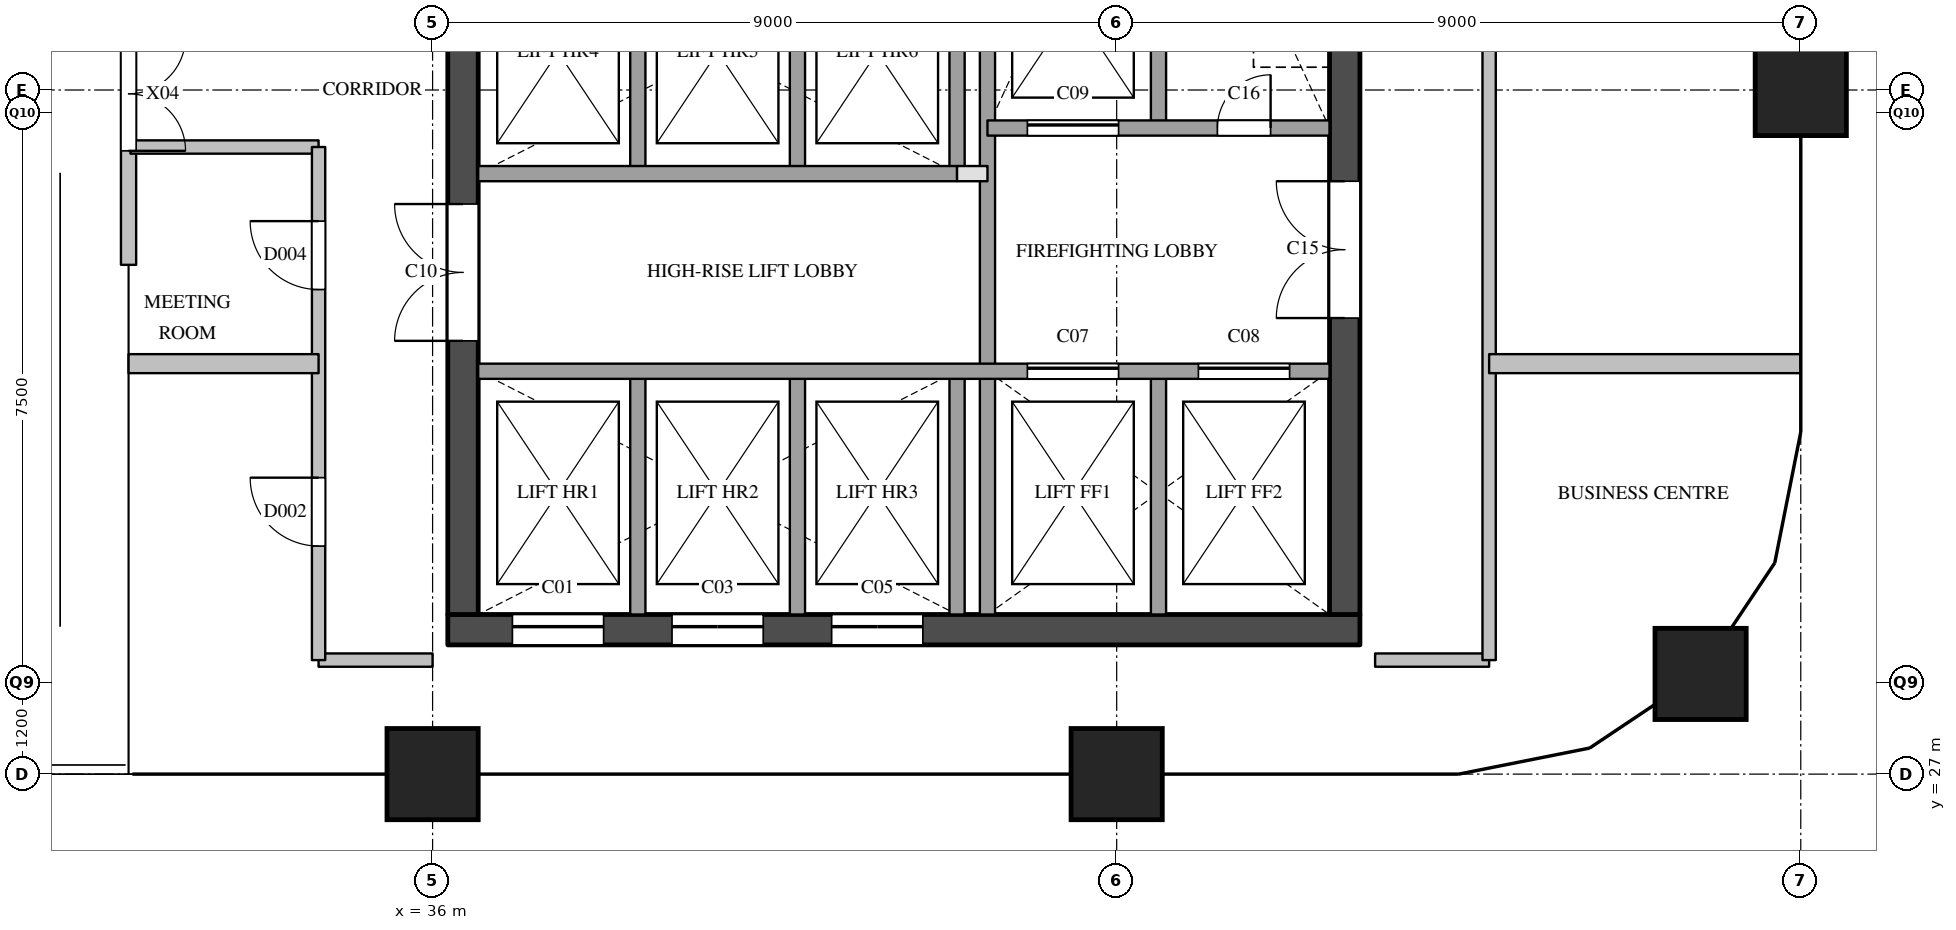
"""IFC4 building model, lengths in metres.
Left out: names, types, materials, properties, quantities, classifications, styles, units other than length and angle.
Written with IfcOpenShell. Run it as: python <this file> out.ifc"""

import sys

from ifc_helpers import new_model, si_unit, direction, frame, frame_2d, origin, origin_2d, place, context, subcontext, project, spatial, rectangle, extrude, element, fill, save


model = new_model("IFC4")
c1 = context("Model", 3, precision=1e-05, world=origin(), true_north=direction((0.0, 1.0)))
c2 = subcontext(c1, "Body", "Model", "MODEL_VIEW")
j1 = project(units=[si_unit("LENGTHUNIT", "METRE"), si_unit("PLANEANGLEUNIT", "RADIAN")], contexts=[c1])
p1 = place(None, origin())
s1 = spatial("IfcSite", under=j1, at=p1, CompositionType="ELEMENT")
p2 = place(p1, origin())
s2 = spatial("IfcBuilding", under=s1, at=p2, CompositionType="ELEMENT")
p3 = place(p2, frame((0.0, 0.0, 203.3)))
s3 = spatial("IfcBuildingStorey", under=s2, at=p3, CompositionType="ELEMENT", Elevation=203.3)
for number, where, z_axis, x_axis in (
    (1, (36.0, 27.0, 0.0), (0.0, 0.0, 1.0), (1.0, 0.0, 0.0)),
    (2, (45.0, 27.0, 0.0), (0.0, 0.0, 1.0), (1.0, 0.0, 0.0)),
    (3, (52.682, 28.318, 0.0), (0.0, 0.0, 1.0), (1.0, 0.0, 0.0)),
    (4, (54.0, 36.0, 0.0), (0.0, 0.0, 1.0), (1.0, 0.0, 0.0)),
):
    element("IfcColumn", number, at=place(p3, frame(where, z_axis=z_axis, x_axis=x_axis)), inside=s3, PredefinedType="COLUMN", context=c2, shape_type="SweptSolid", body=[
        extrude(rectangle(XDim=1.2, YDim=1.2, at=origin_2d()), origin(), (0.0, 0.0, 1.0), 3.9),
    ])
p4 = place(p3, frame((32.0, 38.2, 0.0), z_axis=(0.0, 0.0, 1.0), x_axis=(0.0, -1.0, 0.0)))
e5 = element("IfcWall", 5, at=p4, inside=s3, PredefinedType="SOLIDWALL", context=c2, shape_type="SweptSolid", body=[
    extrude(rectangle(XDim=4.5, YDim=0.2, at=frame_2d((2.25, 0.0))), origin(), (0.0, 0.0, 1.0), 2.6),
])
p5 = place(p4, frame((1.5, 0.0, 0.0)))
e6 = element("IfcOpeningElement", 6, at=p5, cuts=e5, PredefinedType="OPENING", context=c2, shape_type="SweptSolid", body=[
    extrude(rectangle(XDim=1.5, YDim=2.1, at=frame_2d((0.75, 1.05))), frame((0.0, 0.11, 0.0), z_axis=(0.0, -1.0, 0.0), x_axis=(1.0, 0.0, 0.0)), (0.0, 0.0, 1.0), 0.22),
])
p6 = place(p3, frame((36.2, 28.9, 0.0), z_axis=(0.0, 0.0, 1.0), x_axis=(1.0, 0.0, 0.0)))
e7 = element("IfcWall", 7, at=p6, inside=s3, PredefinedType="SHEAR", context=c2, shape_type="SweptSolid", body=[
    extrude(rectangle(XDim=12.0, YDim=0.4, at=frame_2d((6.0, 0.0))), origin(), (0.0, 0.0, 1.0), 3.6),
])
p7 = place(p6, frame((0.85, 0.0, 0.0)))
e8 = element("IfcOpeningElement", 8, at=p7, cuts=e7, PredefinedType="OPENING", context=c2, shape_type="SweptSolid", body=[
    extrude(rectangle(XDim=1.2, YDim=2.1, at=frame_2d((0.6, 1.05))), frame((0.0, 0.21, 0.0), z_axis=(0.0, -1.0, 0.0), x_axis=(1.0, 0.0, 0.0)), (0.0, 0.0, 1.0), 0.42),
])
p8 = place(p6, frame((2.95, 0.0, 0.0)))
e9 = element("IfcOpeningElement", 9, at=p8, cuts=e7, PredefinedType="OPENING", context=c2, shape_type="SweptSolid", body=[
    extrude(rectangle(XDim=1.2, YDim=2.1, at=frame_2d((0.6, 1.05))), frame((0.0, 0.21, 0.0), z_axis=(0.0, -1.0, 0.0), x_axis=(1.0, 0.0, 0.0)), (0.0, 0.0, 1.0), 0.42),
])
p9 = place(p6, frame((5.05, 0.0, 0.0)))
e10 = element("IfcOpeningElement", 10, at=p9, cuts=e7, PredefinedType="OPENING", context=c2, shape_type="SweptSolid", body=[
    extrude(rectangle(XDim=1.2, YDim=2.1, at=frame_2d((0.6, 1.05))), frame((0.0, 0.21, 0.0), z_axis=(0.0, -1.0, 0.0), x_axis=(1.0, 0.0, 0.0)), (0.0, 0.0, 1.0), 0.42),
])
p10 = place(p3, frame((36.4, 29.1, 0.0), z_axis=(0.0, 0.0, 1.0), x_axis=(0.0, 1.0, 0.0)))
e11 = element("IfcWall", 11, at=p10, inside=s3, PredefinedType="SHEAR", context=c2, shape_type="SweptSolid", body=[
    extrude(rectangle(XDim=20.3, YDim=0.4, at=frame_2d((10.15, 0.0))), origin(), (0.0, 0.0, 1.0), 3.6),
])
p11 = place(p10, frame((3.6, 0.0, 0.0)))
e12 = element("IfcOpeningElement", 12, at=p11, cuts=e11, PredefinedType="OPENING", context=c2, shape_type="SweptSolid", body=[
    extrude(rectangle(XDim=1.8, YDim=2.1, at=frame_2d((0.9, 1.05))), frame((0.0, 0.21, 0.0), z_axis=(0.0, -1.0, 0.0), x_axis=(1.0, 0.0, 0.0)), (0.0, 0.0, 1.0), 0.42),
])
p12 = place(p10, frame((16.4, 0.0, 0.0)))
e13 = element("IfcOpeningElement", 13, at=p12, cuts=e11, PredefinedType="OPENING", context=c2, shape_type="SweptSolid", body=[
    extrude(rectangle(XDim=1.0, YDim=2.1, at=frame_2d((0.5, 1.05))), frame((0.0, 0.21, 0.0), z_axis=(0.0, -1.0, 0.0), x_axis=(1.0, 0.0, 0.0)), (0.0, 0.0, 1.0), 0.42),
])
p13 = place(p3, frame((48.0, 29.1, 0.0), z_axis=(0.0, 0.0, 1.0), x_axis=(0.0, 1.0, 0.0)))
e14 = element("IfcWall", 14, at=p13, inside=s3, PredefinedType="SHEAR", context=c2, shape_type="SweptSolid", body=[
    extrude(rectangle(XDim=20.3, YDim=0.4, at=frame_2d((10.15, 0.0))), origin(), (0.0, 0.0, 1.0), 3.6),
])
p14 = place(p13, frame((12.5, 0.0, 0.0)))
e15 = element("IfcOpeningElement", 15, at=p14, cuts=e14, PredefinedType="OPENING", context=c2, shape_type="SweptSolid", body=[
    extrude(rectangle(XDim=0.7, YDim=2.1, at=frame_2d((0.35, 1.05))), frame((0.0, 0.21, 0.0), z_axis=(0.0, -1.0, 0.0), x_axis=(1.0, 0.0, 0.0)), (0.0, 0.0, 1.0), 0.42),
])
p15 = place(p13, frame((3.9, 0.0, 0.0)))
e16 = element("IfcOpeningElement", 16, at=p15, cuts=e14, PredefinedType="OPENING", context=c2, shape_type="SweptSolid", body=[
    extrude(rectangle(XDim=1.8, YDim=2.1, at=frame_2d((0.9, 1.05))), frame((0.0, 0.21, 0.0), z_axis=(0.0, -1.0, 0.0), x_axis=(1.0, 0.0, 0.0)), (0.0, 0.0, 1.0), 0.42),
])
p16 = place(p3, frame((38.7, 29.1, 0.0), z_axis=(0.0, 0.0, 1.0), x_axis=(0.0, 1.0, 0.0)))
e17 = element("IfcWall", 17, at=p16, inside=s3, PredefinedType="SOLIDWALL", context=c2, shape_type="SweptSolid", body=[
    extrude(rectangle(XDim=3.2, YDim=0.2, at=frame_2d((1.6, 0.0))), origin(), (0.0, 0.0, 1.0), 3.6),
])
p17 = place(p3, frame((38.7, 34.9, 0.0), z_axis=(0.0, 0.0, 1.0), x_axis=(0.0, 1.0, 0.0)))
e18 = element("IfcWall", 18, at=p17, inside=s3, PredefinedType="SOLIDWALL", context=c2, shape_type="SweptSolid", body=[
    extrude(rectangle(XDim=3.2, YDim=0.2, at=frame_2d((1.6, 0.0))), origin(), (0.0, 0.0, 1.0), 3.6),
])
p18 = place(p3, frame((40.8, 29.1, 0.0), z_axis=(0.0, 0.0, 1.0), x_axis=(0.0, 1.0, 0.0)))
e19 = element("IfcWall", 19, at=p18, inside=s3, PredefinedType="SOLIDWALL", context=c2, shape_type="SweptSolid", body=[
    extrude(rectangle(XDim=3.2, YDim=0.2, at=frame_2d((1.6, 0.0))), origin(), (0.0, 0.0, 1.0), 3.6),
])
p19 = place(p3, frame((40.8, 34.9, 0.0), z_axis=(0.0, 0.0, 1.0), x_axis=(0.0, 1.0, 0.0)))
e20 = element("IfcWall", 20, at=p19, inside=s3, PredefinedType="SOLIDWALL", context=c2, shape_type="SweptSolid", body=[
    extrude(rectangle(XDim=3.2, YDim=0.2, at=frame_2d((1.6, 0.0))), origin(), (0.0, 0.0, 1.0), 3.6),
])
p20 = place(p3, frame((42.9, 29.1, 0.0), z_axis=(0.0, 0.0, 1.0), x_axis=(0.0, 1.0, 0.0)))
e21 = element("IfcWall", 21, at=p20, inside=s3, PredefinedType="SOLIDWALL", context=c2, shape_type="SweptSolid", body=[
    extrude(rectangle(XDim=3.2, YDim=0.2, at=frame_2d((1.6, 0.0))), origin(), (0.0, 0.0, 1.0), 3.6),
])
p21 = place(p3, frame((42.9, 34.9, 0.0), z_axis=(0.0, 0.0, 1.0), x_axis=(0.0, 1.0, 0.0)))
e22 = element("IfcWall", 22, at=p21, inside=s3, PredefinedType="SOLIDWALL", context=c2, shape_type="SweptSolid", body=[
    extrude(rectangle(XDim=3.2, YDim=0.2, at=frame_2d((1.6, 0.0))), origin(), (0.0, 0.0, 1.0), 3.6),
])
p22 = place(p3, frame((43.3, 29.1, 0.0), z_axis=(0.0, 0.0, 1.0), x_axis=(0.0, 1.0, 0.0)))
e23 = element("IfcWall", 23, at=p22, inside=s3, PredefinedType="SOLIDWALL", context=c2, shape_type="SweptSolid", body=[
    extrude(rectangle(XDim=9.9, YDim=0.2, at=frame_2d((4.95, 0.0))), origin(), (0.0, 0.0, 1.0), 3.6),
])
for number, where, z_axis, x_axis in (
    (24, (45.55, 29.1, 0.0), (0.0, 0.0, 1.0), (0.0, 1.0, 0.0)),
    (25, (45.55, 35.5, 0.0), (0.0, 0.0, 1.0), (0.0, 1.0, 0.0)),
):
    element("IfcWall", number, at=place(p3, frame(where, z_axis=z_axis, x_axis=x_axis)), inside=s3, PredefinedType="SOLIDWALL", context=c2, shape_type="SweptSolid", body=[
        extrude(rectangle(XDim=3.2, YDim=0.2, at=frame_2d((1.6, 0.0))), origin(), (0.0, 0.0, 1.0), 3.6),
    ])
p23 = place(p3, frame((36.6, 32.3, 0.0), z_axis=(0.0, 0.0, 1.0), x_axis=(1.0, 0.0, 0.0)))
e26 = element("IfcWall", 26, at=p23, inside=s3, PredefinedType="SOLIDWALL", context=c2, shape_type="SweptSolid", body=[
    extrude(rectangle(XDim=11.2, YDim=0.2, at=frame_2d((5.6, 0.0))), origin(), (0.0, 0.0, 1.0), 3.6),
])
p24 = place(p23, frame((7.225, 0.0, 0.0)))
e27 = element("IfcOpeningElement", 27, at=p24, cuts=e26, PredefinedType="OPENING", context=c2, shape_type="SweptSolid", body=[
    extrude(rectangle(XDim=1.2, YDim=2.1, at=frame_2d((0.6, 1.05))), frame((0.0, 0.11, 0.0), z_axis=(0.0, -1.0, 0.0), x_axis=(1.0, 0.0, 0.0)), (0.0, 0.0, 1.0), 0.22),
])
p25 = place(p23, frame((9.475, 0.0, 0.0)))
e28 = element("IfcOpeningElement", 28, at=p25, cuts=e26, PredefinedType="OPENING", context=c2, shape_type="SweptSolid", body=[
    extrude(rectangle(XDim=1.2, YDim=2.1, at=frame_2d((0.6, 1.05))), frame((0.0, 0.11, 0.0), z_axis=(0.0, -1.0, 0.0), x_axis=(1.0, 0.0, 0.0)), (0.0, 0.0, 1.0), 0.22),
])
p26 = place(p3, frame((42.9, 34.9, 0.0), z_axis=(0.0, 0.0, 1.0), x_axis=(1.0, 0.0, 0.0)))
e29 = element("IfcWall", 29, at=p26, inside=s3, PredefinedType="PARTITIONING", context=c2, shape_type="SweptSolid", body=[
    extrude(rectangle(XDim=0.4, YDim=0.2, at=frame_2d((0.2, 0.0))), origin(), (0.0, 0.0, 1.0), 3.6),
])
p27 = place(p3, frame((36.6, 34.9, 0.0), z_axis=(0.0, 0.0, 1.0), x_axis=(1.0, 0.0, 0.0)))
e30 = element("IfcWall", 30, at=p27, inside=s3, PredefinedType="SOLIDWALL", context=c2, shape_type="SweptSolid", body=[
    extrude(rectangle(XDim=6.3, YDim=0.2, at=frame_2d((3.15, 0.0))), origin(), (0.0, 0.0, 1.0), 3.6),
])
p28 = place(p3, frame((43.3, 35.5, 0.0), z_axis=(0.0, 0.0, 1.0), x_axis=(1.0, 0.0, 0.0)))
e31 = element("IfcWall", 31, at=p28, inside=s3, PredefinedType="SOLIDWALL", context=c2, shape_type="SweptSolid", body=[
    extrude(rectangle(XDim=4.5, YDim=0.2, at=frame_2d((2.25, 0.0))), origin(), (0.0, 0.0, 1.0), 3.6),
])
p29 = place(p28, frame((0.525, 0.0, 0.0)))
e32 = element("IfcOpeningElement", 32, at=p29, cuts=e31, PredefinedType="OPENING", context=c2, shape_type="SweptSolid", body=[
    extrude(rectangle(XDim=1.2, YDim=2.1, at=frame_2d((0.6, 1.05))), frame((0.0, 0.11, 0.0), z_axis=(0.0, -1.0, 0.0), x_axis=(1.0, 0.0, 0.0)), (0.0, 0.0, 1.0), 0.22),
])
p30 = place(p28, frame((3.025, 0.0, 0.0)))
e33 = element("IfcOpeningElement", 33, at=p30, cuts=e31, PredefinedType="OPENING", context=c2, shape_type="SweptSolid", body=[
    extrude(rectangle(XDim=0.7, YDim=2.1, at=frame_2d((0.35, 1.05))), frame((0.0, 0.11, 0.0), z_axis=(0.0, -1.0, 0.0), x_axis=(1.0, 0.0, 0.0)), (0.0, 0.0, 1.0), 0.22),
])
for number, where, z_axis, x_axis in (
    (34, (34.5, 28.5, 0.0), (0.0, 0.0, 1.0), (1.0, 0.0, 0.0)),
    (35, (48.4, 28.5, 0.0), (0.0, 0.0, 1.0), (1.0, 0.0, 0.0)),
):
    element("IfcWall", number, at=place(p3, frame(where, z_axis=z_axis, x_axis=x_axis)), inside=s3, PredefinedType="PARTITIONING", context=c2, shape_type="SweptSolid", body=[
        extrude(rectangle(XDim=1.5, YDim=0.175, at=frame_2d((0.75, 0.0))), origin(), (0.0, 0.0, 1.0), 3.6),
    ])
p31 = place(p3, frame((32.025, 35.25, 0.0), z_axis=(0.0, 0.0, 1.0), x_axis=(1.0, 0.0, 0.0)))
e36 = element("IfcWall", 36, at=p31, inside=s3, PredefinedType="PARTITIONING", context=c2, shape_type="SweptSolid", body=[
    extrude(rectangle(XDim=2.475, YDim=0.175, at=frame_2d((1.237, 0.0))), origin(), (0.0, 0.0, 1.0), 3.6),
])
p32 = place(p3, frame((34.5, 28.5, 0.0), z_axis=(0.0, 0.0, 1.0), x_axis=(0.0, 1.0, 0.0)))
e37 = element("IfcWall", 37, at=p32, inside=s3, PredefinedType="PARTITIONING", context=c2, shape_type="SweptSolid", body=[
    extrude(rectangle(XDim=6.75, YDim=0.175, at=frame_2d((3.375, 0.0))), origin(), (0.0, 0.0, 1.0), 3.6),
])
p33 = place(p32, frame((1.5, 0.0, 0.0)))
e38 = element("IfcOpeningElement", 38, at=p33, cuts=e37, PredefinedType="OPENING", context=c2, shape_type="SweptSolid", body=[
    extrude(rectangle(XDim=0.9, YDim=2.1, at=frame_2d((0.45, 1.05))), frame((0.0, 0.097, 0.0), z_axis=(0.0, -1.0, 0.0), x_axis=(1.0, 0.0, 0.0)), (0.0, 0.0, 1.0), 0.195),
])
p34 = place(p32, frame((4.875, 0.0, 0.0)))
e39 = element("IfcOpeningElement", 39, at=p34, cuts=e37, PredefinedType="OPENING", context=c2, shape_type="SweptSolid", body=[
    extrude(rectangle(XDim=0.9, YDim=2.1, at=frame_2d((0.45, 1.05))), frame((0.0, 0.097, 0.0), z_axis=(0.0, -1.0, 0.0), x_axis=(1.0, 0.0, 0.0)), (0.0, 0.0, 1.0), 0.195),
])
p35 = place(p3, frame((49.9, 28.5, 0.0), z_axis=(0.0, 0.0, 1.0), x_axis=(0.0, 1.0, 0.0)))
e40 = element("IfcWall", 40, at=p35, inside=s3, PredefinedType="PARTITIONING", context=c2, shape_type="SweptSolid", body=[
    extrude(rectangle(XDim=23.0, YDim=0.175, at=frame_2d((11.5, 0.0))), origin(), (0.0, 0.0, 1.0), 3.6),
])
p36 = place(p35, frame((13.0, 0.0, 0.0)))
e41 = element("IfcOpeningElement", 41, at=p36, cuts=e40, PredefinedType="OPENING", context=c2, shape_type="SweptSolid", body=[
    extrude(rectangle(XDim=0.9, YDim=2.1, at=frame_2d((0.45, 1.05))), frame((0.0, 0.097, 0.0), z_axis=(0.0, -1.0, 0.0), x_axis=(1.0, 0.0, 0.0)), (0.0, 0.0, 1.0), 0.195),
])
p37 = place(p3, frame((32.0, 32.4, 0.0), z_axis=(0.0, 0.0, 1.0), x_axis=(1.0, 0.0, 0.0)))
e42 = element("IfcWall", 42, at=p37, inside=s3, PredefinedType="PARTITIONING", context=c2, shape_type="SweptSolid", body=[
    extrude(rectangle(XDim=2.5, YDim=0.25, at=frame_2d((1.25, 0.0))), origin(), (0.0, 0.0, 1.0), 3.6),
])
p38 = place(p3, frame((49.9, 32.4, 0.0), z_axis=(0.0, 0.0, 1.0), x_axis=(1.0, 0.0, 0.0)))
e43 = element("IfcWall", 43, at=p38, inside=s3, PredefinedType="PARTITIONING", context=c2, shape_type="SweptSolid", body=[
    extrude(rectangle(XDim=4.1, YDim=0.25, at=frame_2d((2.05, 0.0))), origin(), (0.0, 0.0, 1.0), 2.6),
])
p39 = place(p5, origin())
e44 = element("IfcDoor", 44, at=p39, inside=s3, OperationType="DOUBLE_DOOR_SINGLE_SWING", PredefinedType="DOOR", context=c2, shape_type="SweptSolid", body=[
    extrude(rectangle(XDim=1.5, YDim=2.1, at=frame_2d((0.75, 1.05))), frame((0.0, 0.025, 0.0), z_axis=(0.0, -1.0, 0.0), x_axis=(1.0, 0.0, 0.0)), (0.0, 0.0, 1.0), 0.05),
])
fill(e6, e44)
p40 = place(p7, origin())
e45 = element("IfcDoor", 45, at=p40, inside=s3, OperationType="SLIDING_TO_LEFT", PredefinedType="DOOR", context=c2, shape_type="SweptSolid", body=[
    extrude(rectangle(XDim=1.2, YDim=2.1, at=frame_2d((0.6, 1.05))), frame((0.0, 0.025, 0.0), z_axis=(0.0, -1.0, 0.0), x_axis=(1.0, 0.0, 0.0)), (0.0, 0.0, 1.0), 0.05),
])
fill(e8, e45)
p41 = place(p8, origin())
e46 = element("IfcDoor", 46, at=p41, inside=s3, OperationType="SLIDING_TO_LEFT", PredefinedType="DOOR", context=c2, shape_type="SweptSolid", body=[
    extrude(rectangle(XDim=1.2, YDim=2.1, at=frame_2d((0.6, 1.05))), frame((0.0, 0.025, 0.0), z_axis=(0.0, -1.0, 0.0), x_axis=(1.0, 0.0, 0.0)), (0.0, 0.0, 1.0), 0.05),
])
fill(e9, e46)
p42 = place(p9, origin())
e47 = element("IfcDoor", 47, at=p42, inside=s3, OperationType="SLIDING_TO_LEFT", PredefinedType="DOOR", context=c2, shape_type="SweptSolid", body=[
    extrude(rectangle(XDim=1.2, YDim=2.1, at=frame_2d((0.6, 1.05))), frame((0.0, 0.025, 0.0), z_axis=(0.0, -1.0, 0.0), x_axis=(1.0, 0.0, 0.0)), (0.0, 0.0, 1.0), 0.05),
])
fill(e10, e47)
p43 = place(p24, origin())
e48 = element("IfcDoor", 48, at=p43, inside=s3, OperationType="SLIDING_TO_LEFT", PredefinedType="DOOR", context=c2, shape_type="SweptSolid", body=[
    extrude(rectangle(XDim=1.2, YDim=2.1, at=frame_2d((0.6, 1.05))), frame((0.0, 0.025, 0.0), z_axis=(0.0, -1.0, 0.0), x_axis=(1.0, 0.0, 0.0)), (0.0, 0.0, 1.0), 0.05),
])
fill(e27, e48)
p44 = place(p25, origin())
e49 = element("IfcDoor", 49, at=p44, inside=s3, OperationType="SLIDING_TO_LEFT", PredefinedType="DOOR", context=c2, shape_type="SweptSolid", body=[
    extrude(rectangle(XDim=1.2, YDim=2.1, at=frame_2d((0.6, 1.05))), frame((0.0, 0.025, 0.0), z_axis=(0.0, -1.0, 0.0), x_axis=(1.0, 0.0, 0.0)), (0.0, 0.0, 1.0), 0.05),
])
fill(e28, e49)
p45 = place(p29, origin())
e50 = element("IfcDoor", 50, at=p45, inside=s3, OperationType="SLIDING_TO_LEFT", PredefinedType="DOOR", context=c2, shape_type="SweptSolid", body=[
    extrude(rectangle(XDim=1.2, YDim=2.1, at=frame_2d((0.6, 1.05))), frame((0.0, 0.025, 0.0), z_axis=(0.0, -1.0, 0.0), x_axis=(1.0, 0.0, 0.0)), (0.0, 0.0, 1.0), 0.05),
])
fill(e32, e50)
p46 = place(p11, origin())
e51 = element("IfcDoor", 51, at=p46, inside=s3, OperationType="DOUBLE_DOOR_SINGLE_SWING", PredefinedType="DOOR", context=c2, shape_type="SweptSolid", body=[
    extrude(rectangle(XDim=1.8, YDim=2.1, at=frame_2d((0.9, 1.05))), frame((0.0, 0.025, 0.0), z_axis=(0.0, -1.0, 0.0), x_axis=(1.0, 0.0, 0.0)), (0.0, 0.0, 1.0), 0.05),
])
fill(e12, e51)
p47 = place(p15, origin())
e52 = element("IfcDoor", 52, at=p47, inside=s3, OperationType="DOUBLE_DOOR_SINGLE_SWING", PredefinedType="DOOR", context=c2, shape_type="SweptSolid", body=[
    extrude(rectangle(XDim=1.8, YDim=2.1, at=frame_2d((0.9, 1.05))), frame((0.0, 0.025, 0.0), z_axis=(0.0, -1.0, 0.0), x_axis=(1.0, 0.0, 0.0)), (0.0, 0.0, 1.0), 0.05),
])
fill(e16, e52)
p48 = place(p30, origin())
e53 = element("IfcDoor", 53, at=p48, inside=s3, OperationType="SINGLE_SWING_RIGHT", PredefinedType="DOOR", context=c2, shape_type="SweptSolid", body=[
    extrude(rectangle(XDim=0.7, YDim=2.1, at=frame_2d((0.35, 1.05))), frame((0.0, 0.025, 0.0), z_axis=(0.0, -1.0, 0.0), x_axis=(1.0, 0.0, 0.0)), (0.0, 0.0, 1.0), 0.05),
])
fill(e33, e53)
p49 = place(p33, origin())
e54 = element("IfcDoor", 54, at=p49, inside=s3, OperationType="SINGLE_SWING_RIGHT", PredefinedType="DOOR", context=c2, shape_type="SweptSolid", body=[
    extrude(rectangle(XDim=0.9, YDim=2.1, at=frame_2d((0.45, 1.05))), frame((0.0, 0.025, 0.0), z_axis=(0.0, -1.0, 0.0), x_axis=(1.0, 0.0, 0.0)), (0.0, 0.0, 1.0), 0.05),
])
fill(e38, e54)
p50 = place(p34, origin())
e55 = element("IfcDoor", 55, at=p50, inside=s3, OperationType="SINGLE_SWING_RIGHT", PredefinedType="DOOR", context=c2, shape_type="SweptSolid", body=[
    extrude(rectangle(XDim=0.9, YDim=2.1, at=frame_2d((0.45, 1.05))), frame((0.0, 0.025, 0.0), z_axis=(0.0, -1.0, 0.0), x_axis=(1.0, 0.0, 0.0)), (0.0, 0.0, 1.0), 0.05),
])
fill(e39, e55)
save(model, sys.argv[1])
